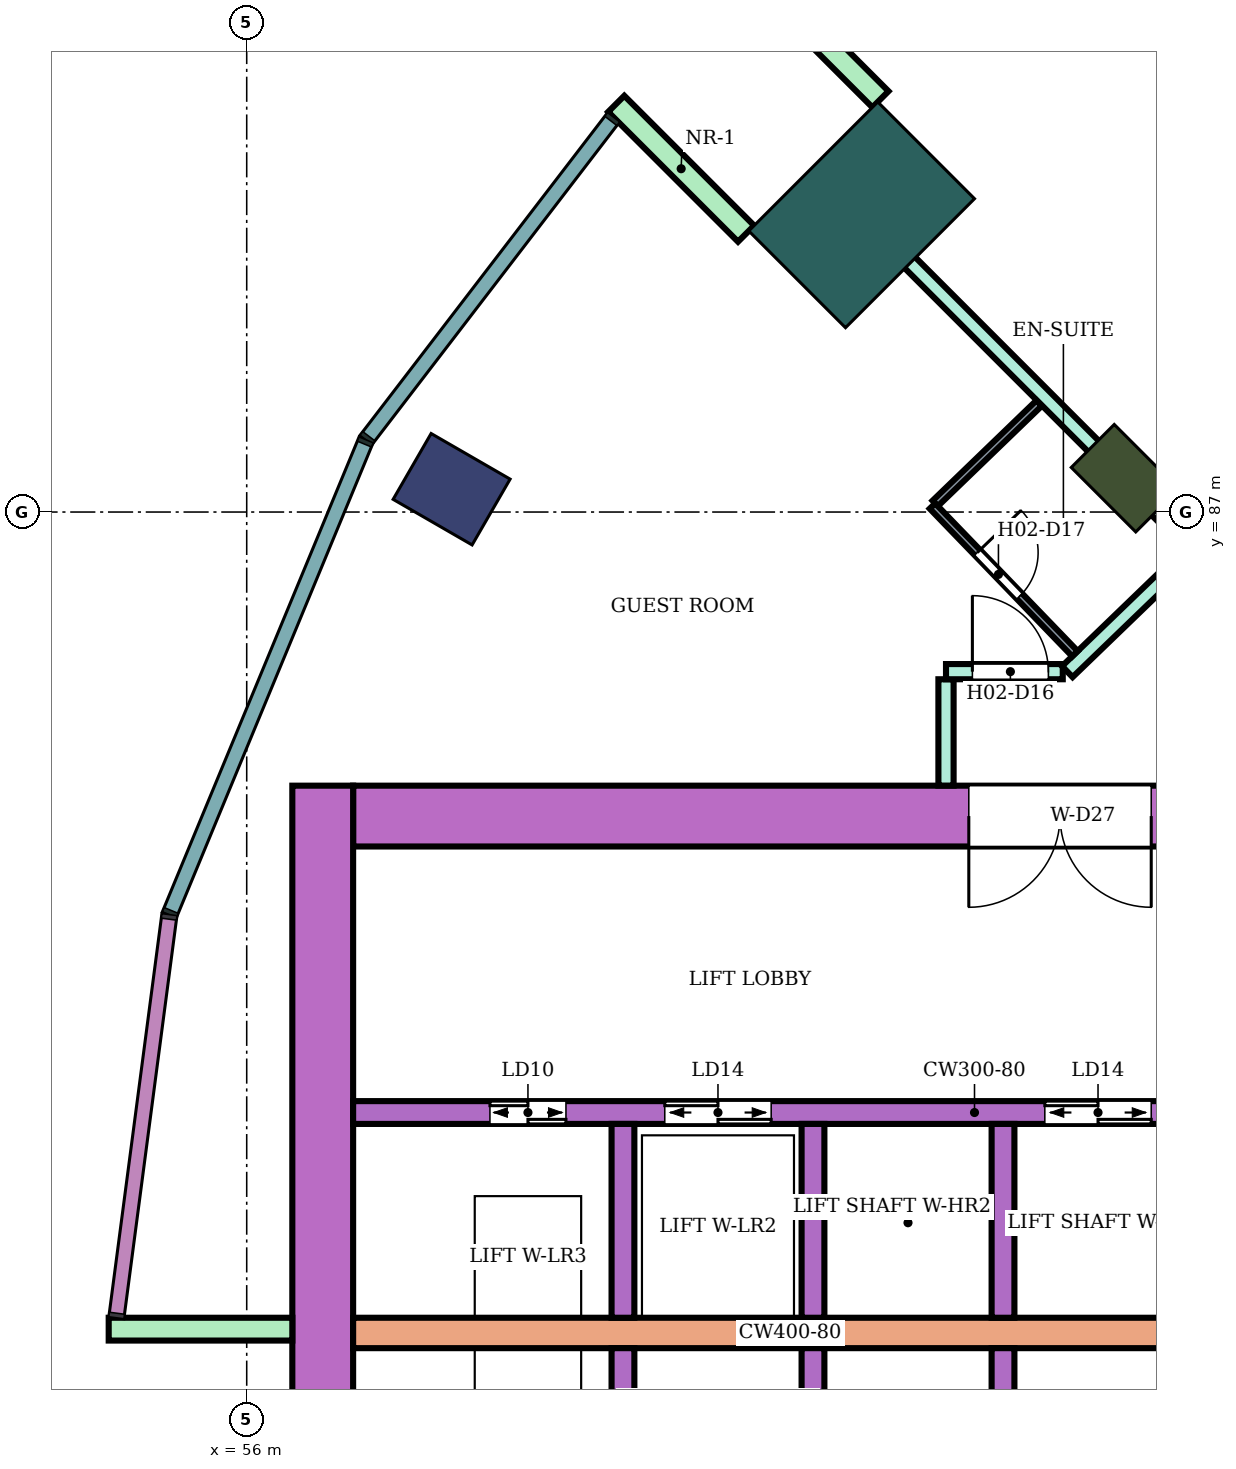
"""IFC4 building model, lengths in metres.
Left out: names, types, materials, properties, quantities, classifications, styles, units other than length and angle.
Written with IfcOpenShell. Run it as: python <this file> out.ifc"""

import sys

from ifc_helpers import new_model, si_unit, direction, frame, frame_2d, origin, origin_2d, place, context, subcontext, project, spatial, rectangle, extrude, element, fill, save


model = new_model("IFC4")
c1 = context("Model", 3, precision=1e-05, world=origin(), true_north=direction((0.0, 1.0)))
c2 = subcontext(c1, "Body", "Model", "MODEL_VIEW")
j1 = project(units=[si_unit("LENGTHUNIT", "METRE"), si_unit("PLANEANGLEUNIT", "RADIAN")], contexts=[c1])
p1 = place(None, origin())
s1 = spatial("IfcSite", under=j1, at=p1, CompositionType="ELEMENT")
p2 = place(p1, origin())
s2 = spatial("IfcBuilding", under=s1, at=p2, CompositionType="ELEMENT")
p3 = place(p2, frame((0.0, 0.0, 40.2)))
s3 = spatial("IfcBuildingStorey", under=s2, at=p3, CompositionType="ELEMENT", Elevation=40.2)
p4 = place(p3, frame((58.696, 87.3, 0.0), z_axis=(0.0, 0.0, 1.0), x_axis=(-0.866025403784, 0.5, 0.0)))
e1 = element("IfcColumn", 1, at=p4, inside=s3, PredefinedType="COLUMN", context=c2, shape_type="SweptSolid", body=[
    extrude(rectangle(XDim=1.2, YDim=1.0, at=origin_2d()), origin(), (0.0, 0.0, 1.0), 3.8),
])
p5 = place(p3, frame((67.555, 87.445, 0.0), z_axis=(0.0, 0.0, 1.0), x_axis=(-0.707106781187, 0.707106781187, 0.0)))
e2 = element("IfcColumn", 2, at=p5, inside=s3, PredefinedType="COLUMN", context=c2, shape_type="SweptSolid", body=[
    extrude(rectangle(XDim=1.2, YDim=0.8, at=origin_2d()), origin(), (0.0, 0.0, 1.0), 3.8),
])
p6 = place(p3, frame((64.09, 90.91, 0.0), z_axis=(0.0, 0.0, 1.0), x_axis=(-0.707106781187, 0.707106781187, 0.0)))
e3 = element("IfcColumn", 3, at=p6, inside=s3, PredefinedType="COLUMN", context=c2, shape_type="SweptSolid", body=[
    extrude(rectangle(XDim=1.8, YDim=2.4, at=origin_2d()), origin(), (0.0, 0.0, 1.0), 3.8),
])
p7 = place(p3, frame((72.1, 83.0, 0.0), z_axis=(0.0, 0.0, 1.0), x_axis=(-1.0, 0.0, 0.0)))
e4 = element("IfcWall", 4, at=p7, inside=s3, PredefinedType="SHEAR", context=c2, shape_type="SweptSolid", body=[
    extrude(rectangle(XDim=14.7, YDim=0.8, at=frame_2d((7.35, 0.0))), origin(), (0.0, 0.0, 1.0), 3.48),
])
p8 = place(p7, frame((4.2, 0.0, 0.0)))
e5 = element("IfcOpeningElement", 5, at=p8, cuts=e4, PredefinedType="OPENING", context=c2, shape_type="SweptSolid", body=[
    extrude(rectangle(XDim=2.4, YDim=2.4, at=frame_2d((1.2, 1.2))), frame((0.0, 0.41, 0.0), z_axis=(0.0, -1.0, 0.0), x_axis=(1.0, 0.0, 0.0)), (0.0, 0.0, 1.0), 0.82),
])
p9 = place(p3, frame((57.0, 83.4, 0.0), z_axis=(0.0, 0.0, 1.0), x_axis=(0.0, -1.0, 0.0)))
e6 = element("IfcWall", 6, at=p9, inside=s3, PredefinedType="SHEAR", context=c2, shape_type="SweptSolid", body=[
    extrude(rectangle(XDim=16.8, YDim=0.8, at=frame_2d((8.4, 0.0))), origin(), (0.0, 0.0, 1.0), 3.48),
])
p10 = place(p3, frame((68.3, 76.2, 0.0), z_axis=(0.0, 0.0, 1.0), x_axis=(-1.0, 0.0, 0.0)))
e7 = element("IfcWall", 7, at=p10, inside=s3, PredefinedType="SHEAR", context=c2, shape_type="SweptSolid", body=[
    extrude(rectangle(XDim=10.9, YDim=0.4, at=frame_2d((5.45, 0.0))), origin(), (0.0, 0.0, 1.0), 3.48),
])
p11 = place(p3, frame((68.3, 79.1, 0.0), z_axis=(0.0, 0.0, 1.0), x_axis=(-1.0, 0.0, 0.0)))
e8 = element("IfcWall", 8, at=p11, inside=s3, PredefinedType="SHEAR", context=c2, shape_type="SweptSolid", body=[
    extrude(rectangle(XDim=10.9, YDim=0.3, at=frame_2d((5.45, 0.0))), origin(), (0.0, 0.0, 1.0), 3.48),
])
p12 = place(p11, frame((0.4, 0.0, 0.0)))
e9 = element("IfcOpeningElement", 9, at=p12, cuts=e8, PredefinedType="OPENING", context=c2, shape_type="SweptSolid", body=[
    extrude(rectangle(XDim=1.4, YDim=2.1, at=frame_2d((0.7, 1.05))), frame((0.0, 0.16, 0.0), z_axis=(0.0, -1.0, 0.0), x_axis=(1.0, 0.0, 0.0)), (0.0, 0.0, 1.0), 0.32),
])
p13 = place(p11, frame((5.4, 0.0, 0.0)))
e10 = element("IfcOpeningElement", 10, at=p13, cuts=e8, PredefinedType="OPENING", context=c2, shape_type="SweptSolid", body=[
    extrude(rectangle(XDim=1.4, YDim=2.1, at=frame_2d((0.7, 1.05))), frame((0.0, 0.16, 0.0), z_axis=(0.0, -1.0, 0.0), x_axis=(1.0, 0.0, 0.0)), (0.0, 0.0, 1.0), 0.32),
])
p14 = place(p11, frame((8.1, 0.0, 0.0)))
e11 = element("IfcOpeningElement", 11, at=p14, cuts=e8, PredefinedType="OPENING", context=c2, shape_type="SweptSolid", body=[
    extrude(rectangle(XDim=1.0, YDim=2.1, at=frame_2d((0.5, 1.05))), frame((0.0, 0.16, 0.0), z_axis=(0.0, -1.0, 0.0), x_axis=(1.0, 0.0, 0.0)), (0.0, 0.0, 1.0), 0.32),
])
for number, where, z_axis, x_axis in (
    (12, (65.95, 76.0, 0.0), (0.0, 0.0, 1.0), (0.0, -1.0, 0.0)),
    (13, (63.45, 76.0, 0.0), (0.0, 0.0, 1.0), (0.0, -1.0, 0.0)),
    (14, (60.95, 76.0, 0.0), (0.0, 0.0, 1.0), (0.0, -1.0, 0.0)),
    (15, (65.95, 78.95, 0.0), (0.0, 0.0, 1.0), (0.0, -1.0, 0.0)),
    (16, (63.45, 78.95, 0.0), (0.0, 0.0, 1.0), (0.0, -1.0, 0.0)),
    (17, (60.95, 78.95, 0.0), (0.0, 0.0, 1.0), (0.0, -1.0, 0.0)),
):
    element("IfcWall", number, at=place(p3, frame(where, z_axis=z_axis, x_axis=x_axis)), inside=s3, PredefinedType="SHEAR", context=c2, shape_type="SweptSolid", body=[
        extrude(rectangle(XDim=2.55, YDim=0.3, at=frame_2d((1.275, 0.0))), origin(), (0.0, 0.0, 1.0), 3.48),
    ])
for number, where, z_axis, x_axis in (
    (18, (64.338, 92.43, 0.0), (0.0, 0.0, 1.0), (-0.707, 0.707, 0.0)),
    (19, (62.57, 90.662, 0.0), (0.0, 0.0, 1.0), (-0.707, 0.707, 0.0)),
    (20, (56.6, 76.25, 0.0), (0.0, 0.0, 1.0), (-1.0, 0.0, 0.0)),
):
    element("IfcWall", number, at=place(p3, frame(where, z_axis=z_axis, x_axis=x_axis)), inside=s3, PredefinedType="NOTDEFINED", context=c2, shape_type="SweptSolid", body=[
        extrude(rectangle(XDim=2.416, YDim=0.3, at=frame_2d((1.208, 0.0))), origin(), (0.0, 0.0, 1.0), 3.8),
    ])
p15 = place(p3, frame((63.599, 91.408, 0.0), z_axis=(0.0, 0.0, 1.0), x_axis=(0.706981017422, -0.707232522587, 0.0)))
e21 = element("IfcWall", 21, at=p15, inside=s3, PredefinedType="PARTITIONING", context=c2, shape_type="SweptSolid", body=[
    extrude(rectangle(XDim=6.795, YDim=0.2, at=frame_2d((3.397, 0.0))), origin(), (0.0, 0.0, 1.0), 3.35),
])
p16 = place(p3, frame((65.2, 83.401, 0.0), z_axis=(0.0, 0.0, 1.0), x_axis=(0.0, 1.0, 0.0)))
e22 = element("IfcWall", 22, at=p16, inside=s3, PredefinedType="PARTITIONING", context=c2, shape_type="SweptSolid", body=[
    extrude(rectangle(XDim=1.399, YDim=0.2, at=frame_2d((0.7, 0.0))), origin(), (0.0, 0.0, 1.0), 3.35),
])
p17 = place(p3, frame((65.2, 84.9, 0.0), z_axis=(0.0, 0.0, 1.0), x_axis=(1.0, 0.0, 0.0)))
e23 = element("IfcWall", 23, at=p17, inside=s3, PredefinedType="PARTITIONING", context=c2, shape_type="SweptSolid", body=[
    extrude(rectangle(XDim=1.536, YDim=0.2, at=frame_2d((0.768, 0.0))), origin(), (0.0, 0.0, 1.0), 3.35),
])
p18 = place(p17, frame((0.347, 0.0, 0.0)))
e24 = element("IfcOpeningElement", 24, at=p18, cuts=e23, PredefinedType="OPENING", context=c2, shape_type="SweptSolid", body=[
    extrude(rectangle(XDim=1.0, YDim=2.1, at=frame_2d((0.5, 1.05))), frame((0.0, 0.11, 0.0), z_axis=(0.0, -1.0, 0.0), x_axis=(1.0, 0.0, 0.0)), (0.0, 0.0, 1.0), 0.22),
])
p19 = place(p3, frame((66.796, 84.9, 0.0), z_axis=(0.0, 0.0, 1.0), x_axis=(0.719690131178, 0.694295409092, 0.0)))
e25 = element("IfcWall", 25, at=p19, inside=s3, PredefinedType="PARTITIONING", context=c2, shape_type="SweptSolid", body=[
    extrude(rectangle(XDim=6.585, YDim=0.2, at=frame_2d((3.293, 0.0))), origin(), (0.0, 0.0, 1.0), 3.35),
])
p20 = place(p19, frame((2.867, 0.0, 0.0)))
e26 = element("IfcOpeningElement", 26, at=p20, cuts=e25, PredefinedType="OPENING", context=c2, shape_type="SweptSolid", body=[
    extrude(rectangle(XDim=1.0, YDim=2.1, at=frame_2d((0.5, 1.05))), frame((0.0, 0.11, 0.0), z_axis=(0.0, -1.0, 0.0), x_axis=(1.0, 0.0, 0.0)), (0.0, 0.0, 1.0), 0.22),
])
p21 = place(p3, frame((67.103, 97.343, 0.0), z_axis=(0.0, 0.0, 1.0), x_axis=(0.499900389553, -0.866082906265, 0.0)))
e27 = element("IfcWall", 27, at=p21, inside=s3, PredefinedType="PARTITIONING", context=c2, shape_type="SweptSolid", body=[
    extrude(rectangle(XDim=8.908, YDim=0.2, at=frame_2d((4.454, 0.0))), origin(), (0.0, 0.0, 1.0), 3.35),
])
p22 = place(p3, frame((65.058, 87.114, 0.0), z_axis=(0.0, 0.0, 1.0), x_axis=(0.719715847356, 0.694268751324, 0.0)))
e28 = element("IfcWall", 28, at=p22, inside=s3, PredefinedType="PARTITIONING", context=c2, shape_type="SweptSolid", body=[
    extrude(rectangle(XDim=1.9, YDim=0.1, at=frame_2d((0.95, 0.0))), origin(), (0.0, 0.0, 1.0), 3.35),
])
p23 = place(p3, frame((65.022, 87.079, 0.0), z_axis=(0.0, 0.0, 1.0), x_axis=(0.694287838235, -0.719697434815, 0.0)))
e29 = element("IfcWall", 29, at=p23, inside=s3, PredefinedType="PARTITIONING", context=c2, shape_type="SweptSolid", body=[
    extrude(rectangle(XDim=2.7, YDim=0.1, at=frame_2d((1.35, 0.0))), origin(), (0.0, 0.0, 1.0), 3.35),
])
p24 = place(p23, frame((0.85, 0.0, 0.0)))
e30 = element("IfcOpeningElement", 30, at=p24, cuts=e29, PredefinedType="OPENING", context=c2, shape_type="SweptSolid", body=[
    extrude(rectangle(XDim=0.8, YDim=2.1, at=frame_2d((0.4, 1.05))), frame((0.0, 0.06, 0.0), z_axis=(0.0, -1.0, 0.0), x_axis=(1.0, 0.0, 0.0)), (0.0, 0.0, 1.0), 0.12),
])
p25 = place(p18, origin())
e31 = element("IfcDoor", 31, at=p25, inside=s3, OperationType="SINGLE_SWING_LEFT", PredefinedType="DOOR", context=c2, shape_type="SweptSolid", body=[
    extrude(rectangle(XDim=1.0, YDim=2.1, at=frame_2d((0.5, 1.05))), frame((0.0, 0.025, 0.0), z_axis=(0.0, -1.0, 0.0), x_axis=(1.0, 0.0, 0.0)), (0.0, 0.0, 1.0), 0.05),
])
fill(e24, e31)
p26 = place(p24, origin())
e32 = element("IfcDoor", 32, at=p26, inside=s3, OperationType="SINGLE_SWING_LEFT", PredefinedType="DOOR", context=c2, shape_type="SweptSolid", body=[
    extrude(rectangle(XDim=0.8, YDim=2.1, at=frame_2d((0.4, 1.05))), frame((0.0, 0.025, 0.0), z_axis=(0.0, -1.0, 0.0), x_axis=(1.0, 0.0, 0.0)), (0.0, 0.0, 1.0), 0.05),
])
fill(e30, e32)
p27 = place(p12, origin())
e33 = element("IfcDoor", 33, at=p27, inside=s3, OperationType="DOUBLE_DOOR_SLIDING", PredefinedType="DOOR", context=c2, shape_type="SweptSolid", body=[
    extrude(rectangle(XDim=1.4, YDim=2.1, at=frame_2d((0.7, 1.05))), frame((0.0, 0.025, 0.0), z_axis=(0.0, -1.0, 0.0), x_axis=(1.0, 0.0, 0.0)), (0.0, 0.0, 1.0), 0.05),
])
fill(e9, e33)
p28 = place(p13, origin())
e34 = element("IfcDoor", 34, at=p28, inside=s3, OperationType="DOUBLE_DOOR_SLIDING", PredefinedType="DOOR", context=c2, shape_type="SweptSolid", body=[
    extrude(rectangle(XDim=1.4, YDim=2.1, at=frame_2d((0.7, 1.05))), frame((0.0, 0.025, 0.0), z_axis=(0.0, -1.0, 0.0), x_axis=(1.0, 0.0, 0.0)), (0.0, 0.0, 1.0), 0.05),
])
fill(e10, e34)
p29 = place(p14, origin())
e35 = element("IfcDoor", 35, at=p29, inside=s3, OperationType="DOUBLE_DOOR_SLIDING", PredefinedType="DOOR", context=c2, shape_type="SweptSolid", body=[
    extrude(rectangle(XDim=1.0, YDim=2.1, at=frame_2d((0.5, 1.05))), frame((0.0, 0.025, 0.0), z_axis=(0.0, -1.0, 0.0), x_axis=(1.0, 0.0, 0.0)), (0.0, 0.0, 1.0), 0.05),
])
fill(e11, e35)
p30 = place(p8, origin())
e36 = element("IfcDoor", 36, at=p30, inside=s3, OperationType="DOUBLE_DOOR_SINGLE_SWING", PredefinedType="DOOR", context=c2, shape_type="SweptSolid", body=[
    extrude(rectangle(XDim=2.4, YDim=2.4, at=frame_2d((1.2, 1.2))), frame((0.0, 0.025, 0.0), z_axis=(0.0, -1.0, 0.0), x_axis=(1.0, 0.0, 0.0)), (0.0, 0.0, 1.0), 0.05),
])
fill(e5, e36)
save(model, sys.argv[1])
